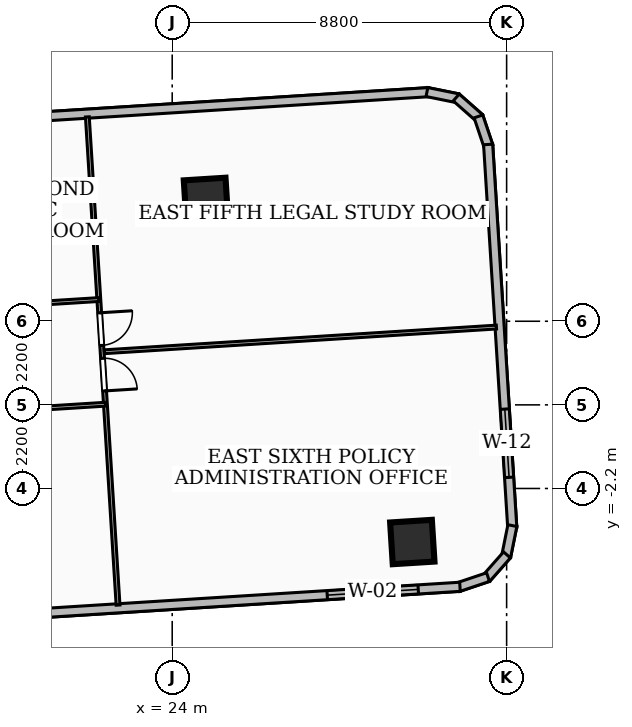
"""IFC4 building model, lengths in metres.
Left out: names, types, materials, properties, quantities, classifications, styles, units other than length and angle.
Written with IfcOpenShell. Run it as: python <this file> out.ifc"""

import sys

from ifc_helpers import new_model, si_unit, direction, frame, frame_2d, origin, origin_2d, place, context, subcontext, project, spatial, rectangle, extrude, element, fill, save


model = new_model("IFC4")
c1 = context("Model", 3, precision=1e-05, world=origin(), true_north=direction((0.0, 1.0)))
c2 = subcontext(c1, "Body", "Model", "MODEL_VIEW")
j1 = project(units=[si_unit("LENGTHUNIT", "METRE"), si_unit("PLANEANGLEUNIT", "RADIAN")], contexts=[c1])
p1 = place(None, origin())
s1 = spatial("IfcSite", under=j1, at=p1, CompositionType="ELEMENT")
p2 = place(p1, origin())
s2 = spatial("IfcBuilding", under=s1, at=p2, CompositionType="ELEMENT")
p3 = place(p2, frame((0.0, 0.0, 49.68)))
s3 = spatial("IfcBuildingStorey", under=s2, at=p3, CompositionType="ELEMENT", Elevation=49.68)
for number, where, z_axis, x_axis in (
    (1, (30.318, -3.609, 0.0), (0.0, 0.0, 1.0), (0.998, 0.063, 0.0)),
    (2, (24.888, 5.393, 0.0), (0.0, 0.0, 1.0), (0.998, 0.063, 0.0)),
):
    element("IfcColumn", number, at=place(p3, frame(where, z_axis=z_axis, x_axis=x_axis)), inside=s3, PredefinedType="COLUMN", context=c2, shape_type="SweptSolid", body=[
        extrude(rectangle(XDim=1.1, YDim=1.1, at=origin_2d()), origin(), (0.0, 0.0, 1.0), 3.6),
    ])
p4 = place(p3, frame((13.911, 7.167, 0.0), z_axis=(0.0, 0.0, 1.0), x_axis=(0.99802143782, 0.062874554885, 0.0)))
e3 = element("IfcWall", 3, at=p4, inside=s3, PredefinedType="SOLIDWALL", context=c2, shape_type="SweptSolid", body=[
    extrude(rectangle(XDim=16.875, YDim=0.24, at=frame_2d((8.438, 0.0))), origin(), (0.0, 0.0, 1.0), 2.624),
])
p5 = place(p4, frame((4.4, 0.0, 0.0)))
e4 = element("IfcOpeningElement", 4, at=p5, cuts=e3, PredefinedType="OPENING", context=c2, shape_type="SweptSolid", body=[
    extrude(rectangle(XDim=1.1, YDim=2.1, at=frame_2d((0.55, 1.05))), frame((0.0, 0.13, 0.0), z_axis=(0.0, -1.0, 0.0), x_axis=(1.0, 0.0, 0.0)), (0.0, 0.0, 1.0), 0.26),
])
p6 = place(p3, frame((30.703, 8.231, 0.0), z_axis=(0.0, 0.0, 1.0), x_axis=(0.980115061473, -0.198430003461, 0.0)))
e5 = element("IfcWall", 5, at=p6, inside=s3, PredefinedType="SOLIDWALL", context=c2, shape_type="SweptSolid", body=[
    extrude(rectangle(XDim=0.832, YDim=0.24, at=frame_2d((0.416, 0.0))), origin(), (0.0, 0.0, 1.0), 3.32),
])
p7 = place(p3, frame((31.474, 8.088, 0.0), z_axis=(0.0, 0.0, 1.0), x_axis=(0.749934065497, -0.661512582954, 0.0)))
e6 = element("IfcWall", 6, at=p7, inside=s3, PredefinedType="SOLIDWALL", context=c2, shape_type="SweptSolid", body=[
    extrude(rectangle(XDim=0.814, YDim=0.24, at=frame_2d((0.407, 0.0))), origin(), (0.0, 0.0, 1.0), 3.32),
])
p8 = place(p3, frame((32.058, 7.59, 0.0), z_axis=(0.0, 0.0, 1.0), x_axis=(0.318960399163, -0.947768043229, 0.0)))
e7 = element("IfcWall", 7, at=p8, inside=s3, PredefinedType="SOLIDWALL", context=c2, shape_type="SweptSolid", body=[
    extrude(rectangle(XDim=0.831, YDim=0.24, at=frame_2d((0.415, 0.0))), origin(), (0.0, 0.0, 1.0), 3.32),
])
p9 = place(p3, frame((32.313, 6.852, 0.0), z_axis=(0.0, 0.0, 1.0), x_axis=(0.062877947964, -0.998021224053, 0.0)))
e8 = element("IfcWall", 8, at=p9, inside=s3, PredefinedType="SOLIDWALL", context=c2, shape_type="SweptSolid", body=[
    extrude(rectangle(XDim=10.099, YDim=0.24, at=frame_2d((5.05, 0.0))), origin(), (0.0, 0.0, 1.0), 3.32),
])
p10 = place(p9, frame((6.977, 0.0, 0.85)))
e9 = element("IfcOpeningElement", 9, at=p10, cuts=e8, PredefinedType="OPENING", context=c2, shape_type="SweptSolid", body=[
    extrude(rectangle(XDim=1.8, YDim=1.6, at=frame_2d((0.9, 0.8))), frame((0.0, 0.13, 0.0), z_axis=(0.0, -1.0, 0.0), x_axis=(1.0, 0.0, 0.0)), (0.0, 0.0, 1.0), 0.26),
])
p11 = place(p3, frame((32.951, -3.177, 0.0), z_axis=(0.0, 0.0, 1.0), x_axis=(-0.197076231398, -0.980388167522, 0.0)))
e10 = element("IfcWall", 10, at=p11, inside=s3, PredefinedType="SOLIDWALL", context=c2, shape_type="SweptSolid", body=[
    extrude(rectangle(XDim=0.831, YDim=0.24, at=frame_2d((0.416, 0.0))), origin(), (0.0, 0.0, 1.0), 3.32),
])
p12 = place(p3, frame((32.809, -3.948, 0.0), z_axis=(0.0, 0.0, 1.0), x_axis=(-0.661532449753, -0.749916540639, 0.0)))
e11 = element("IfcWall", 11, at=p12, inside=s3, PredefinedType="SOLIDWALL", context=c2, shape_type="SweptSolid", body=[
    extrude(rectangle(XDim=0.815, YDim=0.24, at=frame_2d((0.407, 0.0))), origin(), (0.0, 0.0, 1.0), 3.32),
])
p13 = place(p3, frame((32.311, -4.532, 0.0), z_axis=(0.0, 0.0, 1.0), x_axis=(-0.94779876374, -0.318869100812, 0.0)))
e12 = element("IfcWall", 12, at=p13, inside=s3, PredefinedType="SOLIDWALL", context=c2, shape_type="SweptSolid", body=[
    extrude(rectangle(XDim=0.832, YDim=0.24, at=frame_2d((0.416, 0.0))), origin(), (0.0, 0.0, 1.0), 3.32),
])
p14 = place(p3, frame((31.572, -4.787, 0.0), z_axis=(0.0, 0.0, 1.0), x_axis=(-0.998025974342, -0.062802504235, 0.0)))
e13 = element("IfcWall", 13, at=p14, inside=s3, PredefinedType="SOLIDWALL", context=c2, shape_type="SweptSolid", body=[
    extrude(rectangle(XDim=16.875, YDim=0.24, at=frame_2d((8.438, 0.0))), origin(), (0.0, 0.0, 1.0), 3.32),
])
p15 = place(p14, frame((1.1, 0.0, 0.85)))
e14 = element("IfcOpeningElement", 14, at=p15, cuts=e13, PredefinedType="OPENING", context=c2, shape_type="SweptSolid", body=[
    extrude(rectangle(XDim=2.4, YDim=2.1, at=frame_2d((1.2, 1.05))), frame((0.0, 0.13, 0.0), z_axis=(0.0, -1.0, 0.0), x_axis=(1.0, 0.0, 0.0)), (0.0, 0.0, 1.0), 0.26),
])
p16 = place(p3, frame((22.07, 2.771, 0.0), z_axis=(0.0, 0.0, 1.0), x_axis=(-0.998031627252, -0.062712606425, 0.0)))
e15 = element("IfcWall", 15, at=p16, inside=s3, PredefinedType="PARTITIONING", context=c2, shape_type="SweptSolid", body=[
    extrude(rectangle(XDim=7.911, YDim=0.1, at=frame_2d((3.955, 0.0))), origin(), (0.0, 0.0, 1.0), 3.32),
])
p17 = place(p16, frame((6.096, 0.0, 0.0)))
e16 = element("IfcOpeningElement", 16, at=p17, cuts=e15, PredefinedType="OPENING", context=c2, shape_type="SweptSolid", body=[
    extrude(rectangle(XDim=0.86, YDim=2.04, at=frame_2d((0.43, 1.02))), frame((0.0, 0.06, 0.0), z_axis=(0.0, -1.0, 0.0), x_axis=(1.0, 0.0, 0.0)), (0.0, 0.0, 1.0), 0.12),
])
p18 = place(p16, frame((2.141, 0.0, 0.0)))
e17 = element("IfcOpeningElement", 17, at=p18, cuts=e15, PredefinedType="OPENING", context=c2, shape_type="SweptSolid", body=[
    extrude(rectangle(XDim=0.86, YDim=2.04, at=frame_2d((0.43, 1.02))), frame((0.0, 0.06, 0.0), z_axis=(0.0, -1.0, 0.0), x_axis=(1.0, 0.0, 0.0)), (0.0, 0.0, 1.0), 0.12),
])
p19 = place(p3, frame((14.348, -0.48, 0.0), z_axis=(0.0, 0.0, 1.0), x_axis=(0.998023893104, 0.062835569496, 0.0)))
e18 = element("IfcWall", 18, at=p19, inside=s3, PredefinedType="PARTITIONING", context=c2, shape_type="SweptSolid", body=[
    extrude(rectangle(XDim=7.911, YDim=0.1, at=frame_2d((3.955, 0.0))), origin(), (0.0, 0.0, 1.0), 3.32),
])
p20 = place(p19, frame((3.475, 0.0, 0.0)))
e19 = element("IfcOpeningElement", 19, at=p20, cuts=e18, PredefinedType="OPENING", context=c2, shape_type="SweptSolid", body=[
    extrude(rectangle(XDim=0.9, YDim=2.06, at=frame_2d((0.45, 1.03))), frame((0.0, 0.06, 0.0), z_axis=(0.0, -1.0, 0.0), x_axis=(1.0, 0.0, 0.0)), (0.0, 0.0, 1.0), 0.12),
])
p21 = place(p3, frame((22.216, 1.398, 0.0), z_axis=(0.0, 0.0, 1.0), x_axis=(0.998025462108, 0.062810643876, 0.0)))
e20 = element("IfcWall", 20, at=p21, inside=s3, PredefinedType="PARTITIONING", context=c2, shape_type="SweptSolid", body=[
    extrude(rectangle(XDim=10.335, YDim=0.1, at=frame_2d((5.168, 0.0))), origin(), (0.0, 0.0, 1.0), 2.812),
])
p22 = place(p3, frame((21.767, 7.577, 0.0), z_axis=(0.0, 0.0, 1.0), x_axis=(0.062769180357, -0.998028070746, 0.0)))
e21 = element("IfcWall", 21, at=p22, inside=s3, PredefinedType="PARTITIONING", context=c2, shape_type="SweptSolid", body=[
    extrude(rectangle(XDim=12.87, YDim=0.1, at=frame_2d((6.435, 0.0))), origin(), (0.0, 0.0, 1.0), 2.401),
])
p23 = place(p22, frame((6.365, 0.0, 0.0)))
e22 = element("IfcOpeningElement", 22, at=p23, cuts=e21, PredefinedType="OPENING", context=c2, shape_type="SweptSolid", body=[
    extrude(rectangle(XDim=0.86, YDim=2.04, at=frame_2d((0.43, 1.02))), frame((0.0, 0.06, 0.0), z_axis=(0.0, -1.0, 0.0), x_axis=(1.0, 0.0, 0.0)), (0.0, 0.0, 1.0), 0.12),
])
p24 = place(p22, frame((5.165, 0.0, 0.0)))
e23 = element("IfcOpeningElement", 23, at=p24, cuts=e21, PredefinedType="OPENING", context=c2, shape_type="SweptSolid", body=[
    extrude(rectangle(XDim=0.86, YDim=2.04, at=frame_2d((0.43, 1.02))), frame((0.0, 0.06, 0.0), z_axis=(0.0, -1.0, 0.0), x_axis=(1.0, 0.0, 0.0)), (0.0, 0.0, 1.0), 0.12),
])
p25 = place(p10, origin())
e24 = element("IfcWindow", 24, at=p25, inside=s3, PartitioningType="SINGLE_PANEL", PredefinedType="WINDOW", context=c2, shape_type="SweptSolid", body=[
    extrude(rectangle(XDim=1.8, YDim=1.6, at=frame_2d((0.9, 0.8))), frame((0.0, 0.03, 0.0), z_axis=(0.0, -1.0, 0.0), x_axis=(1.0, 0.0, 0.0)), (0.0, 0.0, 1.0), 0.06),
])
fill(e9, e24)
p26 = place(p15, origin())
e25 = element("IfcWindow", 25, at=p26, inside=s3, PartitioningType="SINGLE_PANEL", PredefinedType="WINDOW", context=c2, shape_type="SweptSolid", body=[
    extrude(rectangle(XDim=2.4, YDim=2.1, at=frame_2d((1.2, 1.05))), frame((0.0, 0.03, 0.0), z_axis=(0.0, -1.0, 0.0), x_axis=(1.0, 0.0, 0.0)), (0.0, 0.0, 1.0), 0.06),
])
fill(e14, e25)
p27 = place(p23, origin())
e26 = element("IfcDoor", 26, at=p27, inside=s3, OperationType="SINGLE_SWING_RIGHT", PredefinedType="DOOR", context=c2, shape_type="SweptSolid", body=[
    extrude(rectangle(XDim=0.86, YDim=2.04, at=frame_2d((0.43, 1.02))), frame((0.0, 0.025, 0.0), z_axis=(0.0, -1.0, 0.0), x_axis=(1.0, 0.0, 0.0)), (0.0, 0.0, 1.0), 0.05),
])
fill(e22, e26)
p28 = place(p24, origin())
e27 = element("IfcDoor", 27, at=p28, inside=s3, OperationType="SINGLE_SWING_LEFT", PredefinedType="DOOR", context=c2, shape_type="SweptSolid", body=[
    extrude(rectangle(XDim=0.86, YDim=2.04, at=frame_2d((0.43, 1.02))), frame((0.0, 0.025, 0.0), z_axis=(0.0, -1.0, 0.0), x_axis=(1.0, 0.0, 0.0)), (0.0, 0.0, 1.0), 0.05),
])
fill(e23, e27)
save(model, sys.argv[1])
